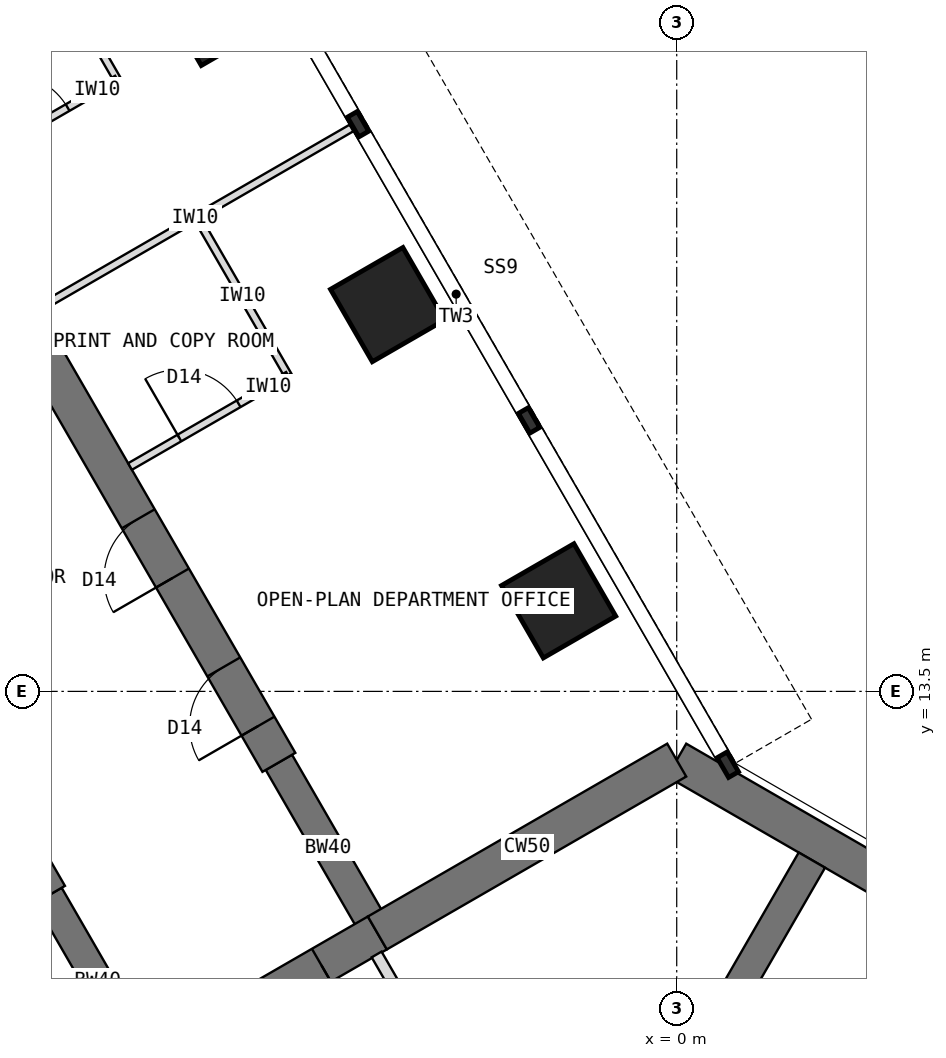
"""IFC4 building model, lengths in metres.
Left out: names, types, materials, properties, quantities, classifications, styles, units other than length and angle.
Written with IfcOpenShell. Run it as: python <this file> out.ifc"""

import sys

from ifc_helpers import new_model, si_unit, direction, frame, frame_2d, origin, origin_2d, place, context, subcontext, project, spatial, rectangle, extrude, element, fill, save


model = new_model("IFC4")
c1 = context("Model", 3, precision=1e-05, world=origin(), true_north=direction((0.0, 1.0)))
c2 = subcontext(c1, "Body", "Model", "MODEL_VIEW")
j1 = project(units=[si_unit("LENGTHUNIT", "METRE"), si_unit("PLANEANGLEUNIT", "RADIAN")], contexts=[c1])
p1 = place(None, origin())
s1 = spatial("IfcSite", under=j1, at=p1, CompositionType="ELEMENT")
p2 = place(p1, origin())
s2 = spatial("IfcBuilding", under=s1, at=p2, CompositionType="ELEMENT")
p3 = place(p2, frame((0.0, 0.0, 218.5)))
s3 = spatial("IfcBuildingStorey", under=s2, at=p3, CompositionType="ELEMENT", Elevation=218.5)
p4 = place(p3, frame((10.908, 6.298, 0.0), z_axis=(0.0, 0.0, 1.0), x_axis=(-0.866021940709, 0.500005998175, 0.0)))
e1 = element("IfcWall", 1, at=p4, inside=s3, PredefinedType="SHEAR", context=c2, shape_type="SweptSolid", body=[
    extrude(rectangle(XDim=12.596, YDim=0.5, at=frame_2d((6.298, 0.0))), origin(), (0.0, 0.0, 1.0), 4.0),
])
p5 = place(p3, frame((0.0, 12.596, 0.0), z_axis=(0.0, 0.0, 1.0), x_axis=(-0.866011268655, -0.500024481964, 0.0)))
e2 = element("IfcWall", 2, at=p5, inside=s3, PredefinedType="SHEAR", context=c2, shape_type="SweptSolid", body=[
    extrude(rectangle(XDim=4.548, YDim=0.5, at=frame_2d((2.274, 0.0))), origin(), (0.0, 0.0, 1.0), 4.0),
])
p6 = place(p3, frame((-3.939, 10.322, 0.0), z_axis=(0.0, 0.0, 1.0), x_axis=(-0.866019471182, -0.500010275428, 0.0)))
e3 = element("IfcWall", 3, at=p6, inside=s3, PredefinedType="SHEAR", context=c2, shape_type="SweptSolid", body=[
    extrude(rectangle(XDim=3.5, YDim=0.5, at=frame_2d((1.75, 0.0))), origin(), (0.0, 0.0, 1.0), 4.0),
])
p7 = place(p6, frame((0.85, 0.0, 0.0)))
e4 = element("IfcOpeningElement", 4, at=p7, cuts=e3, PredefinedType="OPENING", context=c2, shape_type="SweptSolid", body=[
    extrude(rectangle(XDim=1.8, YDim=2.1, at=frame_2d((0.9, 1.05))), frame((0.0, 0.26, 0.0), z_axis=(0.0, -1.0, 0.0), x_axis=(1.0, 0.0, 0.0)), (0.0, 0.0, 1.0), 0.52),
])
p8 = place(p3, frame((-6.97, 8.572, 0.0), z_axis=(0.0, 0.0, 1.0), x_axis=(-0.499988811324, 0.866031863473, 0.0)))
e5 = element("IfcWall", 5, at=p8, inside=s3, PredefinedType="SHEAR", context=c2, shape_type="SweptSolid", body=[
    extrude(rectangle(XDim=2.592, YDim=0.4, at=frame_2d((1.296, 0.0))), origin(), (0.0, 0.0, 1.0), 4.0),
])
p9 = place(p3, frame((-8.266, 10.816, 0.0), z_axis=(0.0, 0.0, 1.0), x_axis=(-0.499996231654, 0.866027579429, 0.0)))
e6 = element("IfcWall", 6, at=p9, inside=s3, PredefinedType="SHEAR", context=c2, shape_type="SweptSolid", body=[
    extrude(rectangle(XDim=13.2, YDim=0.5, at=frame_2d((6.6, 0.0))), origin(), (0.0, 0.0, 1.0), 4.0),
])
p10 = place(p9, frame((0.55, 0.0, 0.0)))
e7 = element("IfcOpeningElement", 7, at=p10, cuts=e6, PredefinedType="OPENING", context=c2, shape_type="SweptSolid", body=[
    extrude(rectangle(XDim=0.9, YDim=2.1, at=frame_2d((0.45, 1.05))), frame((0.0, 0.26, 0.0), z_axis=(0.0, -1.0, 0.0), x_axis=(1.0, 0.0, 0.0)), (0.0, 0.0, 1.0), 0.52),
])
p11 = place(p9, frame((2.8, 0.0, 0.0)))
e8 = element("IfcOpeningElement", 8, at=p11, cuts=e6, PredefinedType="OPENING", context=c2, shape_type="SweptSolid", body=[
    extrude(rectangle(XDim=0.9, YDim=2.1, at=frame_2d((0.45, 1.05))), frame((0.0, 0.26, 0.0), z_axis=(0.0, -1.0, 0.0), x_axis=(1.0, 0.0, 0.0)), (0.0, 0.0, 1.0), 0.52),
])
p12 = place(p9, frame((7.3, 0.0, 0.0)))
e9 = element("IfcOpeningElement", 9, at=p12, cuts=e6, PredefinedType="OPENING", context=c2, shape_type="SweptSolid", body=[
    extrude(rectangle(XDim=0.9, YDim=2.1, at=frame_2d((0.45, 1.05))), frame((0.0, 0.26, 0.0), z_axis=(0.0, -1.0, 0.0), x_axis=(1.0, 0.0, 0.0)), (0.0, 0.0, 1.0), 0.52),
])
p13 = place(p3, frame((-3.939, 10.322, 0.0), z_axis=(0.0, 0.0, 1.0), x_axis=(-0.499918158782, 0.866072649678, 0.0)))
e10 = element("IfcWall", 10, at=p13, inside=s3, PredefinedType="SHEAR", context=c2, shape_type="SweptSolid", body=[
    extrude(rectangle(XDim=2.592, YDim=0.4, at=frame_2d((1.296, 0.0))), origin(), (0.0, 0.0, 1.0), 4.0),
])
p14 = place(p3, frame((-5.234, 12.566, 0.0), z_axis=(0.0, 0.0, 1.0), x_axis=(-0.500010103361, 0.866019570528, 0.0)))
e11 = element("IfcWall", 11, at=p14, inside=s3, PredefinedType="SHEAR", context=c2, shape_type="SweptSolid", body=[
    extrude(rectangle(XDim=13.2, YDim=0.5, at=frame_2d((6.6, 0.0))), origin(), (0.0, 0.0, 1.0), 4.0),
])
p15 = place(p14, frame((0.55, 0.0, 0.0)))
e12 = element("IfcOpeningElement", 12, at=p15, cuts=e11, PredefinedType="OPENING", context=c2, shape_type="SweptSolid", body=[
    extrude(rectangle(XDim=0.9, YDim=2.1, at=frame_2d((0.45, 1.05))), frame((0.0, 0.26, 0.0), z_axis=(0.0, -1.0, 0.0), x_axis=(1.0, 0.0, 0.0)), (0.0, 0.0, 1.0), 0.52),
])
p16 = place(p14, frame((2.8, 0.0, 0.0)))
e13 = element("IfcOpeningElement", 13, at=p16, cuts=e11, PredefinedType="OPENING", context=c2, shape_type="SweptSolid", body=[
    extrude(rectangle(XDim=0.9, YDim=2.1, at=frame_2d((0.45, 1.05))), frame((0.0, 0.26, 0.0), z_axis=(0.0, -1.0, 0.0), x_axis=(1.0, 0.0, 0.0)), (0.0, 0.0, 1.0), 0.52),
])
p17 = place(p14, frame((7.3, 0.0, 0.0)))
e14 = element("IfcOpeningElement", 14, at=p17, cuts=e11, PredefinedType="OPENING", context=c2, shape_type="SweptSolid", body=[
    extrude(rectangle(XDim=0.9, YDim=2.1, at=frame_2d((0.45, 1.05))), frame((0.0, 0.26, 0.0), z_axis=(0.0, -1.0, 0.0), x_axis=(1.0, 0.0, 0.0)), (0.0, 0.0, 1.0), 0.52),
])
for number, where, z_axis, x_axis in (
    (15, (-1.554, 14.691, 0.0), (0.0, 0.0, 1.0), (0.866, 0.5, 0.0)),
    (16, (-3.804, 18.588, 0.0), (0.0, 0.0, 1.0), (0.866, 0.5, 0.0)),
    (17, (-6.054, 22.486, 0.0), (0.0, 0.0, 1.0), (0.866, 0.5, 0.0)),
):
    element("IfcColumn", number, at=place(p3, frame(where, z_axis=z_axis, x_axis=x_axis)), inside=s3, PredefinedType="COLUMN", context=c2, shape_type="SweptSolid", body=[
        extrude(rectangle(XDim=1.1, YDim=1.1, at=origin_2d()), origin(), (0.0, 0.0, 1.0), 4.0),
    ])
p18 = place(p3, frame((-1.201, 6.12, 0.0), z_axis=(0.0, 0.0, 1.0), x_axis=(0.500021575205, 0.866012946976, 0.0)))
e18 = element("IfcWall", 18, at=p18, inside=s3, PredefinedType="SHEAR", context=c2, shape_type="SweptSolid", body=[
    extrude(rectangle(XDim=5.958, YDim=0.4, at=frame_2d((2.979, 0.0))), origin(), (0.0, 0.0, 1.0), 4.0),
])
p19 = place(p3, frame((-8.393, 18.537, 0.0), z_axis=(0.0, 0.0, 1.0), x_axis=(0.866033238375, 0.499986429846, 0.0)))
e19 = element("IfcWall", 19, at=p19, inside=s3, PredefinedType="PARTITIONING", context=c2, shape_type="SweptSolid", body=[
    extrude(rectangle(XDim=4.75, YDim=0.1, at=frame_2d((2.375, 0.0))), origin(), (0.0, 0.0, 1.0), 3.8),
])
p20 = place(p3, frame((-5.115, 17.658, 0.0), z_axis=(0.0, 0.0, 1.0), x_axis=(-0.499957262057, 0.866050077142, 0.0)))
e20 = element("IfcWall", 20, at=p20, inside=s3, PredefinedType="PARTITIONING", context=c2, shape_type="SweptSolid", body=[
    extrude(rectangle(XDim=2.4, YDim=0.1, at=frame_2d((1.2, 0.0))), origin(), (0.0, 0.0, 1.0), 3.8),
])
p21 = place(p3, frame((-7.193, 16.458, 0.0), z_axis=(0.0, 0.0, 1.0), x_axis=(0.866024647952, 0.500001309137, 0.0)))
e21 = element("IfcWall", 21, at=p21, inside=s3, PredefinedType="PARTITIONING", context=c2, shape_type="SweptSolid", body=[
    extrude(rectangle(XDim=2.4, YDim=0.1, at=frame_2d((1.2, 0.0))), origin(), (0.0, 0.0, 1.0), 3.8),
])
p22 = place(p21, frame((0.75, 0.0, 0.0)))
e22 = element("IfcOpeningElement", 22, at=p22, cuts=e21, PredefinedType="OPENING", context=c2, shape_type="SweptSolid", body=[
    extrude(rectangle(XDim=0.9, YDim=2.1, at=frame_2d((0.45, 1.05))), frame((0.0, 0.06, 0.0), z_axis=(0.0, -1.0, 0.0), x_axis=(1.0, 0.0, 0.0)), (0.0, 0.0, 1.0), 0.12),
])
p23 = place(p3, frame((-7.365, 21.556, 0.0), z_axis=(0.0, 0.0, 1.0), x_axis=(-0.500001309137, 0.866024647952, 0.0)))
e23 = element("IfcWall", 23, at=p23, inside=s3, PredefinedType="PARTITIONING", context=c2, shape_type="SweptSolid", body=[
    extrude(rectangle(XDim=2.4, YDim=0.1, at=frame_2d((1.2, 0.0))), origin(), (0.0, 0.0, 1.0), 3.8),
])
p24 = place(p3, frame((-9.443, 20.356, 0.0), z_axis=(0.0, 0.0, 1.0), x_axis=(0.866024647952, 0.500001309137, 0.0)))
e24 = element("IfcWall", 24, at=p24, inside=s3, PredefinedType="PARTITIONING", context=c2, shape_type="SweptSolid", body=[
    extrude(rectangle(XDim=2.4, YDim=0.1, at=frame_2d((1.2, 0.0))), origin(), (0.0, 0.0, 1.0), 3.8),
])
p25 = place(p24, frame((0.75, 0.0, 0.0)))
e25 = element("IfcOpeningElement", 25, at=p25, cuts=e24, PredefinedType="OPENING", context=c2, shape_type="SweptSolid", body=[
    extrude(rectangle(XDim=0.9, YDim=2.1, at=frame_2d((0.45, 1.05))), frame((0.0, 0.06, 0.0), z_axis=(0.0, -1.0, 0.0), x_axis=(1.0, 0.0, 0.0)), (0.0, 0.0, 1.0), 0.12),
])
p26 = place(p3, frame((-3.948, 10.039, 0.0), z_axis=(0.0, 0.0, 1.0), x_axis=(0.500001558674, -0.866024503882, 0.0)))
e26 = element("IfcWall", 26, at=p26, inside=s3, PredefinedType="PARTITIONING", context=c2, shape_type="SweptSolid", body=[
    extrude(rectangle(XDim=4.568, YDim=0.15, at=frame_2d((2.284, 0.0))), origin(), (0.0, 0.0, 1.0), 3.8),
])
p27 = place(p26, frame((1.774, 0.0, 0.0)))
e27 = element("IfcOpeningElement", 27, at=p27, cuts=e26, PredefinedType="OPENING", context=c2, shape_type="SweptSolid", body=[
    extrude(rectangle(XDim=1.0, YDim=2.1, at=frame_2d((0.5, 1.05))), frame((0.0, 0.085, 0.0), z_axis=(0.0, -1.0, 0.0), x_axis=(1.0, 0.0, 0.0)), (0.0, 0.0, 1.0), 0.17),
])
p28 = place(p7, origin())
e28 = element("IfcDoor", 28, at=p28, inside=s3, OperationType="DOUBLE_DOOR_DOUBLE_SWING", PredefinedType="DOOR", context=c2, shape_type="SweptSolid", body=[
    extrude(rectangle(XDim=1.8, YDim=2.1, at=frame_2d((0.9, 1.05))), frame((0.0, 0.025, 0.0), z_axis=(0.0, -1.0, 0.0), x_axis=(1.0, 0.0, 0.0)), (0.0, 0.0, 1.0), 0.05),
])
fill(e4, e28)
p29 = place(p22, origin())
e29 = element("IfcDoor", 29, at=p29, inside=s3, OperationType="SINGLE_SWING_LEFT", PredefinedType="DOOR", context=c2, shape_type="SweptSolid", body=[
    extrude(rectangle(XDim=0.9, YDim=2.1, at=frame_2d((0.45, 1.05))), frame((0.0, 0.025, 0.0), z_axis=(0.0, -1.0, 0.0), x_axis=(1.0, 0.0, 0.0)), (0.0, 0.0, 1.0), 0.05),
])
fill(e22, e29)
p30 = place(p25, origin())
e30 = element("IfcDoor", 30, at=p30, inside=s3, OperationType="SINGLE_SWING_LEFT", PredefinedType="DOOR", context=c2, shape_type="SweptSolid", body=[
    extrude(rectangle(XDim=0.9, YDim=2.1, at=frame_2d((0.45, 1.05))), frame((0.0, 0.025, 0.0), z_axis=(0.0, -1.0, 0.0), x_axis=(1.0, 0.0, 0.0)), (0.0, 0.0, 1.0), 0.05),
])
fill(e25, e30)
p31 = place(p15, origin())
e31 = element("IfcDoor", 31, at=p31, inside=s3, OperationType="SINGLE_SWING_LEFT", PredefinedType="DOOR", context=c2, shape_type="SweptSolid", body=[
    extrude(rectangle(XDim=0.9, YDim=2.1, at=frame_2d((0.45, 1.05))), frame((0.0, 0.025, 0.0), z_axis=(0.0, -1.0, 0.0), x_axis=(1.0, 0.0, 0.0)), (0.0, 0.0, 1.0), 0.05),
])
fill(e12, e31)
p32 = place(p16, origin())
e32 = element("IfcDoor", 32, at=p32, inside=s3, OperationType="SINGLE_SWING_LEFT", PredefinedType="DOOR", context=c2, shape_type="SweptSolid", body=[
    extrude(rectangle(XDim=0.9, YDim=2.1, at=frame_2d((0.45, 1.05))), frame((0.0, 0.025, 0.0), z_axis=(0.0, -1.0, 0.0), x_axis=(1.0, 0.0, 0.0)), (0.0, 0.0, 1.0), 0.05),
])
fill(e13, e32)
save(model, sys.argv[1])
